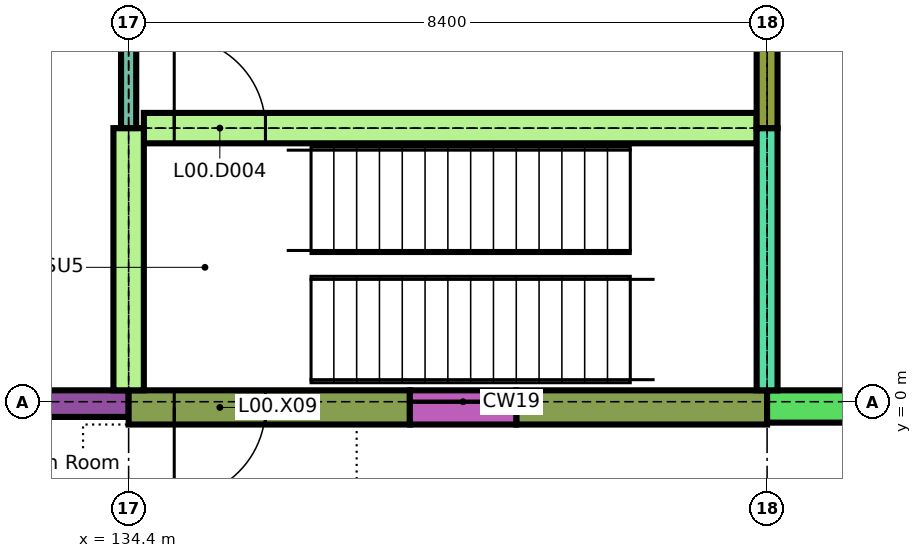
"""IFC4 building model, lengths in metres.
Left out: names, types, materials, properties, quantities, classifications, styles, units other than length and angle.
Written with IfcOpenShell. Run it as: python <this file> out.ifc"""

import sys

from ifc_helpers import new_model, si_unit, direction, frame, frame_2d, origin, place, context, subcontext, project, spatial, rectangle, extrude, element, fill, save


model = new_model("IFC4")
c1 = context("Model", 3, precision=1e-05, world=origin(), true_north=direction((0.0, 1.0)))
c2 = subcontext(c1, "Body", "Model", "MODEL_VIEW")
j1 = project(units=[si_unit("LENGTHUNIT", "METRE"), si_unit("PLANEANGLEUNIT", "RADIAN")], contexts=[c1])
p1 = place(None, origin())
s1 = spatial("IfcSite", under=j1, at=p1, CompositionType="ELEMENT")
p2 = place(p1, origin())
s2 = spatial("IfcBuilding", under=s1, at=p2, CompositionType="ELEMENT")
p3 = place(p2, origin())
s3 = spatial("IfcBuildingStorey", under=s2, at=p3, CompositionType="ELEMENT", Elevation=0.0)
p4 = place(p3, frame((130.2, -0.025, 0.0), z_axis=(0.0, 0.0, 1.0), x_axis=(1.0, 0.0, 0.0)))
e1 = element("IfcWall", 1, at=p4, inside=s3, PredefinedType="SOLIDWALL", context=c2, shape_type="SweptSolid", body=[
    extrude(rectangle(XDim=4.2, YDim=0.35, at=frame_2d((2.1, 0.0))), origin(), (0.0, 0.0, 1.0), 3.84),
])
p5 = place(p4, frame((1.05, 0.0, 0.9)))
e2 = element("IfcOpeningElement", 2, at=p5, cuts=e1, PredefinedType="OPENING", context=c2, shape_type="SweptSolid", body=[
    extrude(rectangle(XDim=2.1, YDim=2.1, at=frame_2d((1.05, 1.05))), frame((0.0, 0.185, 0.0), z_axis=(0.0, -1.0, 0.0), x_axis=(1.0, 0.0, 0.0)), (0.0, 0.0, 1.0), 0.37),
])
p6 = place(p3, frame((134.4, -0.075, 0.0), z_axis=(0.0, 0.0, 1.0), x_axis=(1.0, 0.0, 0.0)))
e3 = element("IfcWall", 3, at=p6, inside=s3, PredefinedType="SOLIDWALL", context=c2, shape_type="SweptSolid", body=[
    extrude(rectangle(XDim=3.7, YDim=0.45, at=frame_2d((1.85, 0.0))), origin(), (0.0, 0.0, 1.0), 4.14),
])
p7 = place(p6, frame((0.6, 0.0, 0.0)))
e4 = element("IfcOpeningElement", 4, at=p7, cuts=e3, PredefinedType="OPENING", context=c2, shape_type="SweptSolid", body=[
    extrude(rectangle(XDim=1.2, YDim=2.1, at=frame_2d((0.6, 1.05))), frame((0.0, 0.235, 0.0), z_axis=(0.0, -1.0, 0.0), x_axis=(1.0, 0.0, 0.0)), (0.0, 0.0, 1.0), 0.47),
])
p8 = place(p3, frame((139.5, -0.075, 0.0), z_axis=(0.0, 0.0, 1.0), x_axis=(1.0, 0.0, 0.0)))
e5 = element("IfcWall", 5, at=p8, inside=s3, PredefinedType="SOLIDWALL", context=c2, shape_type="SweptSolid", body=[
    extrude(rectangle(XDim=3.3, YDim=0.45, at=frame_2d((1.65, 0.0))), origin(), (0.0, 0.0, 1.0), 4.14),
])
p9 = place(p3, frame((138.1, -0.075, 0.0), z_axis=(0.0, 0.0, 1.0), x_axis=(1.0, 0.0, 0.0)))
e6 = element("IfcWall", 6, at=p9, inside=s3, PredefinedType="SOLIDWALL", context=c2, shape_type="SweptSolid", body=[
    extrude(rectangle(XDim=1.4, YDim=0.45, at=frame_2d((0.7, 0.0))), origin(), (0.0, 0.0, 1.0), 0.6),
])
p10 = place(p3, frame((142.8, -0.062, 0.0), z_axis=(0.0, 0.0, 1.0), x_axis=(1.0, 0.0, 0.0)))
e7 = element("IfcWall", 7, at=p10, inside=s3, PredefinedType="SOLIDWALL", context=c2, shape_type="SweptSolid", body=[
    extrude(rectangle(XDim=5.6, YDim=0.425, at=frame_2d((2.8, 0.0))), origin(), (0.0, 0.0, 1.0), 3.84),
])
p11 = place(p3, frame((134.6, 3.6, 0.0), z_axis=(0.0, 0.0, 1.0), x_axis=(1.0, 0.0, 0.0)))
e8 = element("IfcWall", 8, at=p11, inside=s3, PredefinedType="SHEAR", context=c2, shape_type="SweptSolid", body=[
    extrude(rectangle(XDim=8.062, YDim=0.4, at=frame_2d((4.031, 0.0))), origin(), (0.0, 0.0, 1.0), 4.14),
])
p12 = place(p11, frame((0.4, 0.0, 0.0)))
e9 = element("IfcOpeningElement", 9, at=p12, cuts=e8, PredefinedType="OPENING", context=c2, shape_type="SweptSolid", body=[
    extrude(rectangle(XDim=1.2, YDim=2.1, at=frame_2d((0.6, 1.05))), frame((0.0, 0.21, 0.0), z_axis=(0.0, -1.0, 0.0), x_axis=(1.0, 0.0, 0.0)), (0.0, 0.0, 1.0), 0.42),
])
p13 = place(p3, frame((134.4, 0.15, 0.0), z_axis=(0.0, 0.0, 1.0), x_axis=(0.0, 1.0, 0.0)))
e10 = element("IfcWall", 10, at=p13, inside=s3, PredefinedType="SHEAR", context=c2, shape_type="SweptSolid", body=[
    extrude(rectangle(XDim=3.45, YDim=0.4, at=frame_2d((1.725, 0.0))), origin(), (0.0, 0.0, 1.0), 4.14),
])
p14 = place(p3, frame((134.4, 3.6, 0.0), z_axis=(0.0, 0.0, 1.0), x_axis=(0.0, 1.0, 0.0)))
e11 = element("IfcWall", 11, at=p14, inside=s3, PredefinedType="PARTITIONING", context=c2, shape_type="SweptSolid", body=[
    extrude(rectangle(XDim=4.7, YDim=0.2, at=frame_2d((2.35, 0.0))), origin(), (0.0, 0.0, 1.0), 4.14),
])
p15 = place(p3, frame((142.8, 0.15, 0.0), z_axis=(0.0, 0.0, 1.0), x_axis=(0.0, 1.0, 0.0)))
e12 = element("IfcWall", 12, at=p15, inside=s3, PredefinedType="SOLIDWALL", context=c2, shape_type="SweptSolid", body=[
    extrude(rectangle(XDim=3.45, YDim=0.275, at=frame_2d((1.725, 0.0))), origin(), (0.0, 0.0, 1.0), 4.14),
])
p16 = place(p3, frame((142.8, 3.6, 0.0), z_axis=(0.0, 0.0, 1.0), x_axis=(0.0, 1.0, 0.0)))
e13 = element("IfcWall", 13, at=p16, inside=s3, PredefinedType="SOLIDWALL", context=c2, shape_type="SweptSolid", body=[
    extrude(rectangle(XDim=4.662, YDim=0.275, at=frame_2d((2.331, 0.0))), origin(), (0.0, 0.0, 1.0), 4.14),
])
p17 = place(p7, frame((1.2, 0.0, 0.0), x_axis=(-1.0, 0.0, 0.0)))
e14 = element("IfcDoor", 14, at=p17, inside=s3, OperationType="SINGLE_SWING_LEFT", PredefinedType="DOOR", context=c2, shape_type="SweptSolid", body=[
    extrude(rectangle(XDim=1.2, YDim=2.1, at=frame_2d((0.6, 1.05))), frame((0.0, 0.025, 0.0), z_axis=(0.0, -1.0, 0.0), x_axis=(1.0, 0.0, 0.0)), (0.0, 0.0, 1.0), 0.05),
])
fill(e4, e14)
p18 = place(p12, origin())
e15 = element("IfcDoor", 15, at=p18, inside=s3, OperationType="SINGLE_SWING_RIGHT", PredefinedType="DOOR", context=c2, shape_type="SweptSolid", body=[
    extrude(rectangle(XDim=1.2, YDim=2.1, at=frame_2d((0.6, 1.05))), frame((0.0, 0.025, 0.0), z_axis=(0.0, -1.0, 0.0), x_axis=(1.0, 0.0, 0.0)), (0.0, 0.0, 1.0), 0.05),
])
fill(e9, e15)
save(model, sys.argv[1])
